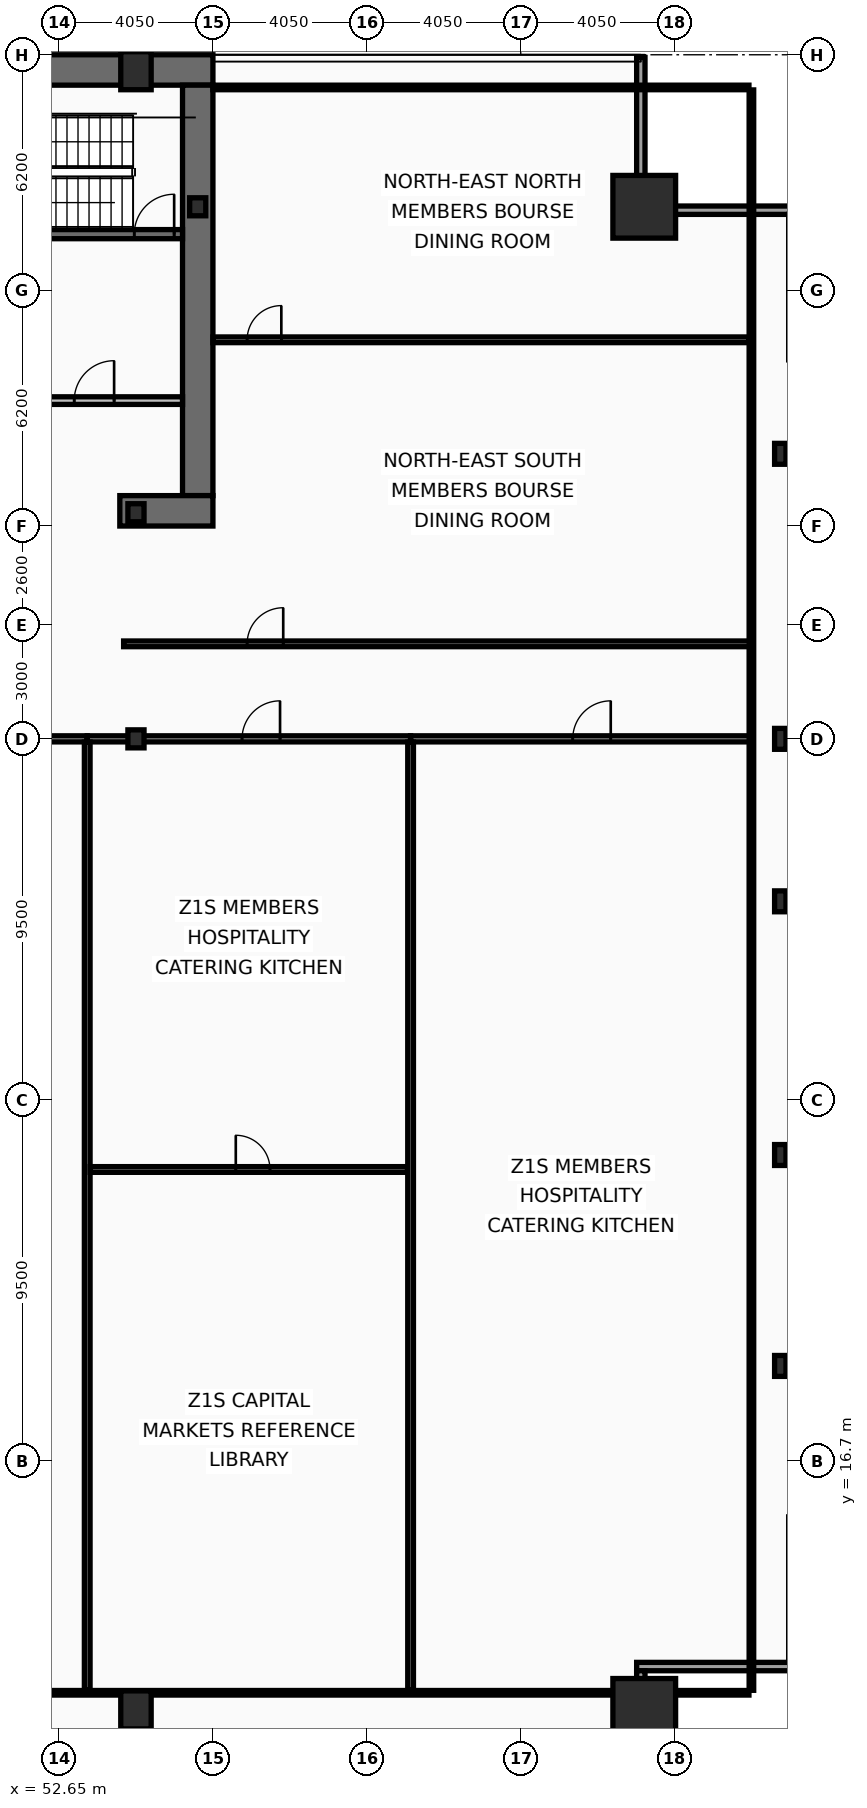
"""IFC4 building model, lengths in metres.
Left out: names, types, materials, properties, quantities, classifications, styles, units other than length and angle.
Written with IfcOpenShell. Run it as: python <this file> out.ifc"""

import sys

from ifc_helpers import new_model, si_unit, direction, frame, frame_2d, origin, origin_2d, place, context, subcontext, project, spatial, rectangle, hollow_rectangle, i_section, extrude, element, fill, save


model = new_model("IFC4")
c1 = context("Model", 3, precision=1e-05, world=origin(), true_north=direction((0.0, 1.0)))
c2 = subcontext(c1, "Body", "Model", "MODEL_VIEW")
j1 = project(units=[si_unit("LENGTHUNIT", "METRE"), si_unit("PLANEANGLEUNIT", "RADIAN")], contexts=[c1])
p1 = place(None, origin())
s1 = spatial("IfcSite", under=j1, at=p1, CompositionType="ELEMENT")
p2 = place(p1, origin())
s2 = spatial("IfcBuilding", under=s1, at=p2, CompositionType="ELEMENT")
p3 = place(p2, frame((0.0, 0.0, 45.8)))
s3 = spatial("IfcBuildingStorey", under=s2, at=p3, CompositionType="ELEMENT", Elevation=45.8)
p4 = place(p3, frame((16.2, 53.3, 0.0), z_axis=(0.0, 0.0, 1.0), x_axis=(1.0, 0.0, 0.0)))
e1 = element("IfcWall", 1, at=p4, inside=s3, PredefinedType="SHEAR", context=c2, shape_type="SweptSolid", body=[
    extrude(rectangle(XDim=40.5, YDim=0.8, at=frame_2d((20.25, 0.0))), origin(), (0.0, 0.0, 1.0), 3.82),
])
p5 = place(p3, frame((56.3, 52.9, 0.0), z_axis=(0.0, 0.0, 1.0), x_axis=(0.0, -1.0, 0.0)))
e2 = element("IfcWall", 2, at=p5, inside=s3, PredefinedType="SHEAR", context=c2, shape_type="SweptSolid", body=[
    extrude(rectangle(XDim=10.8, YDim=0.8, at=frame_2d((5.4, 0.0))), origin(), (0.0, 0.0, 1.0), 3.82),
])
p6 = place(p3, frame((56.7, 41.7, 0.0), z_axis=(0.0, 0.0, 1.0), x_axis=(-1.0, 0.0, 0.0)))
e3 = element("IfcWall", 3, at=p6, inside=s3, PredefinedType="SHEAR", context=c2, shape_type="SweptSolid", body=[
    extrude(rectangle(XDim=2.45, YDim=0.8, at=frame_2d((1.225, 0.0))), origin(), (0.0, 0.0, 1.0), 3.82),
])
p7 = place(p3, frame((48.63, 48.98, 0.0), z_axis=(0.0, 0.0, 1.0), x_axis=(1.0, 0.0, 0.0)))
e4 = element("IfcWall", 4, at=p7, inside=s3, PredefinedType="SHEAR", context=c2, shape_type="SweptSolid", body=[
    extrude(rectangle(XDim=7.27, YDim=0.24, at=frame_2d((3.635, 0.0))), origin(), (0.0, 0.0, 1.0), 3.82),
])
p8 = place(p7, frame((6.0, 0.0, 0.0)))
e5 = element("IfcOpeningElement", 5, at=p8, cuts=e4, PredefinedType="OPENING", context=c2, shape_type="SweptSolid", body=[
    extrude(rectangle(XDim=1.05, YDim=2.15, at=frame_2d((0.525, 1.075))), frame((0.0, 0.13, 0.0), z_axis=(0.0, -1.0, 0.0), x_axis=(1.0, 0.0, 0.0)), (0.0, 0.0, 1.0), 0.26),
])
for number, where, z_axis, x_axis in (
    (6, (68.05, 10.15, 0.0), (0.0, 0.0, 1.0), (1.0, 0.0, 0.0)),
    (7, (68.05, 49.7, 0.0), (0.0, 0.0, 1.0), (1.0, 0.0, 0.0)),
):
    element("IfcColumn", number, at=place(p3, frame(where, z_axis=z_axis, x_axis=x_axis)), inside=s3, PredefinedType="COLUMN", context=c2, shape_type="SweptSolid", body=[
        extrude(hollow_rectangle(XDim=1.65, YDim=1.65, WallThickness=0.075, at=origin_2d()), origin(), (0.0, 0.0, 1.0), 4.0),
    ])
for number, where, z_axis, x_axis in (
    (8, (54.675, 10.15, 0.0), (0.0, 0.0, 1.0), (1.0, 0.0, 0.0)),
    (9, (54.675, 53.28, 0.0), (0.0, 0.0, 1.0), (1.0, 0.0, 0.0)),
):
    element("IfcColumn", number, at=place(p3, frame(where, z_axis=z_axis, x_axis=x_axis)), inside=s3, PredefinedType="COLUMN", context=c2, shape_type="SweptSolid", body=[
        extrude(hollow_rectangle(XDim=0.8, YDim=1.0, WallThickness=0.055, at=origin_2d()), origin(), (0.0, 0.0, 1.0), 4.0),
    ])
for number, where, z_axis, x_axis in (
    (10, (71.63, 19.2, 0.0), (0.0, 0.0, 1.0), (1.0, 0.0, 0.0)),
    (11, (71.63, 24.75, 0.0), (0.0, 0.0, 1.0), (1.0, 0.0, 0.0)),
    (12, (71.63, 31.425, 0.0), (0.0, 0.0, 1.0), (1.0, 0.0, 0.0)),
    (13, (71.63, 35.7, 0.0), (0.0, 0.0, 1.0), (1.0, 0.0, 0.0)),
    (14, (71.63, 43.2, 0.0), (0.0, 0.0, 1.0), (1.0, 0.0, 0.0)),
):
    element("IfcColumn", number, at=place(p3, frame(where, z_axis=z_axis, x_axis=x_axis)), inside=s3, PredefinedType="COLUMN", context=c2, shape_type="SweptSolid", body=[
        extrude(i_section(OverallWidth=0.3, OverallDepth=0.55, WebThickness=0.015, FlangeThickness=0.029, at=origin_2d()), origin(), (0.0, 0.0, 1.0), 4.0),
    ])
for number, where, z_axis, x_axis in (
    (15, (56.3, 49.7, 0.0), (0.0, 0.0, 1.0), (1.0, 0.0, 0.0)),
    (16, (54.675, 35.7, 0.0), (0.0, 0.0, 1.0), (1.0, 0.0, 0.0)),
    (17, (54.675, 41.65, 0.0), (0.0, 0.0, 1.0), (1.0, 0.0, 0.0)),
):
    element("IfcColumn", number, at=place(p3, frame(where, z_axis=z_axis, x_axis=x_axis)), inside=s3, PredefinedType="COLUMN", context=c2, shape_type="SweptSolid", body=[
        extrude(i_section(OverallWidth=0.424, OverallDepth=0.474, WebThickness=0.048, FlangeThickness=0.077, at=origin_2d()), origin(), (0.0, 0.0, 1.0), 4.0),
    ])
p9 = place(p3, frame((67.96, 53.63, 0.0), z_axis=(0.0, 0.0, 1.0), x_axis=(0.0, -1.0, 0.0)))
e18 = element("IfcWall", 18, at=p9, inside=s3, PredefinedType="SOLIDWALL", context=c2, shape_type="SweptSolid", body=[
    extrude(rectangle(XDim=3.91, YDim=0.22, at=frame_2d((1.955, 0.0))), origin(), (0.0, 0.0, 1.0), 3.16),
])
for number, where, z_axis, x_axis in (
    (19, (67.85, 49.61, 0.0), (0.0, 0.0, 1.0), (1.0, 0.0, 0.0)),
    (20, (72.07, 11.29, 0.0), (0.0, 0.0, 1.0), (-1.0, 0.0, 0.0)),
):
    element("IfcWall", number, at=place(p3, frame(where, z_axis=z_axis, x_axis=x_axis)), inside=s3, PredefinedType="SOLIDWALL", context=c2, shape_type="SweptSolid", body=[
        extrude(rectangle(XDim=4.22, YDim=0.22, at=frame_2d((2.11, 0.0))), origin(), (0.0, 0.0, 1.0), 3.16),
    ])
p10 = place(p3, frame((67.96, 11.18, 0.0), z_axis=(0.0, 0.0, 1.0), x_axis=(0.0, -1.0, 0.0)))
e21 = element("IfcWall", 21, at=p10, inside=s3, PredefinedType="SOLIDWALL", context=c2, shape_type="SweptSolid", body=[
    extrude(rectangle(XDim=3.91, YDim=0.22, at=frame_2d((1.955, 0.0))), origin(), (0.0, 0.0, 1.0), 3.16),
])
p11 = place(p3, frame((51.9, 44.6, 0.0), z_axis=(0.0, 0.0, 1.0), x_axis=(1.0, 0.0, 0.0)))
e22 = element("IfcWall", 22, at=p11, inside=s3, PredefinedType="PARTITIONING", context=c2, shape_type="SweptSolid", body=[
    extrude(rectangle(XDim=4.0, YDim=0.2, at=frame_2d((2.0, 0.0))), origin(), (0.0, 0.0, 1.0), 3.82),
])
p12 = place(p11, frame((1.15, 0.0, 0.0)))
e23 = element("IfcOpeningElement", 23, at=p12, cuts=e22, PredefinedType="OPENING", context=c2, shape_type="SweptSolid", body=[
    extrude(rectangle(XDim=1.05, YDim=2.15, at=frame_2d((0.525, 1.075))), frame((0.0, 0.11, 0.0), z_axis=(0.0, -1.0, 0.0), x_axis=(1.0, 0.0, 0.0)), (0.0, 0.0, 1.0), 0.22),
])
p13 = place(p3, frame((54.35, 38.2, 0.0), z_axis=(0.0, 0.0, 1.0), x_axis=(1.0, 0.0, 0.0)))
e24 = element("IfcWall", 24, at=p13, inside=s3, PredefinedType="PARTITIONING", context=c2, shape_type="SweptSolid", body=[
    extrude(rectangle(XDim=16.52, YDim=0.15, at=frame_2d((8.26, 0.0))), origin(), (0.0, 0.0, 1.0), 3.01),
])
p14 = place(p13, frame((3.25, 0.0, 0.0)))
e25 = element("IfcOpeningElement", 25, at=p14, cuts=e24, PredefinedType="OPENING", context=c2, shape_type="SweptSolid", body=[
    extrude(rectangle(XDim=0.95, YDim=2.05, at=frame_2d((0.475, 1.025))), frame((0.0, 0.085, 0.0), z_axis=(0.0, -1.0, 0.0), x_axis=(1.0, 0.0, 0.0)), (0.0, 0.0, 1.0), 0.17),
])
p15 = place(p3, frame((56.7, 46.2, 0.0), z_axis=(0.0, 0.0, 1.0), x_axis=(1.0, 0.0, 0.0)))
e26 = element("IfcWall", 26, at=p15, inside=s3, PredefinedType="PARTITIONING", context=c2, shape_type="SweptSolid", body=[
    extrude(rectangle(XDim=14.105, YDim=0.15, at=frame_2d((7.052, 0.0))), origin(), (0.0, 0.0, 1.0), 3.16),
])
p16 = place(p15, frame((0.9, 0.0, 0.0)))
e27 = element("IfcOpeningElement", 27, at=p16, cuts=e26, PredefinedType="OPENING", context=c2, shape_type="SweptSolid", body=[
    extrude(rectangle(XDim=0.9, YDim=2.05, at=frame_2d((0.45, 1.025))), frame((0.0, 0.085, 0.0), z_axis=(0.0, -1.0, 0.0), x_axis=(1.0, 0.0, 0.0)), (0.0, 0.0, 1.0), 0.17),
])
p17 = place(p3, frame((35.595, 35.7, 0.0), z_axis=(0.0, 0.0, 1.0), x_axis=(1.0, 0.0, 0.0)))
e28 = element("IfcWall", 28, at=p17, inside=s3, PredefinedType="PARTITIONING", context=c2, shape_type="SweptSolid", body=[
    extrude(rectangle(XDim=17.797, YDim=0.16, at=frame_2d((8.899, 0.0))), origin(), (0.0, 0.0, 1.0), 3.01),
])
p18 = place(p17, frame((7.975, 0.0, 0.0)))
e29 = element("IfcOpeningElement", 29, at=p18, cuts=e28, PredefinedType="OPENING", context=c2, shape_type="SweptSolid", body=[
    extrude(rectangle(XDim=1.6, YDim=2.15, at=frame_2d((0.8, 1.075))), frame((0.0, 0.09, 0.0), z_axis=(0.0, -1.0, 0.0), x_axis=(1.0, 0.0, 0.0)), (0.0, 0.0, 1.0), 0.18),
])
p19 = place(p3, frame((53.392, 35.7, 0.0), z_axis=(0.0, 0.0, 1.0), x_axis=(1.0, 0.0, 0.0)))
e30 = element("IfcWall", 30, at=p19, inside=s3, PredefinedType="PARTITIONING", context=c2, shape_type="SweptSolid", body=[
    extrude(rectangle(XDim=8.51, YDim=0.16, at=frame_2d((4.255, 0.0))), origin(), (0.0, 0.0, 1.0), 3.01),
])
p20 = place(p19, frame((4.074, 0.0, 0.0)))
e31 = element("IfcOpeningElement", 31, at=p20, cuts=e30, PredefinedType="OPENING", context=c2, shape_type="SweptSolid", body=[
    extrude(rectangle(XDim=1.0, YDim=2.05, at=frame_2d((0.5, 1.025))), frame((0.0, 0.09, 0.0), z_axis=(0.0, -1.0, 0.0), x_axis=(1.0, 0.0, 0.0)), (0.0, 0.0, 1.0), 0.18),
])
p21 = place(p3, frame((53.392, 10.665, 0.0), z_axis=(0.0, 0.0, 1.0), x_axis=(0.0, 1.0, 0.0)))
e32 = element("IfcWall", 32, at=p21, inside=s3, PredefinedType="PARTITIONING", context=c2, shape_type="SweptSolid", body=[
    extrude(rectangle(XDim=24.95, YDim=0.15, at=frame_2d((12.475, 0.0))), origin(), (0.0, 0.0, 1.0), 3.21),
])
p22 = place(p3, frame((53.472, 24.369, 0.0), z_axis=(0.0, 0.0, 1.0), x_axis=(1.0, 0.0, 0.0)))
e33 = element("IfcWall", 33, at=p22, inside=s3, PredefinedType="PARTITIONING", context=c2, shape_type="SweptSolid", body=[
    extrude(rectangle(XDim=8.349, YDim=0.15, at=frame_2d((4.175, 0.0))), origin(), (0.0, 0.0, 1.0), 3.01),
])
p23 = place(p22, frame((3.829, 0.0, 0.0)))
e34 = element("IfcOpeningElement", 34, at=p23, cuts=e33, PredefinedType="OPENING", context=c2, shape_type="SweptSolid", body=[
    extrude(rectangle(XDim=0.9, YDim=2.05, at=frame_2d((0.45, 1.025))), frame((0.0, 0.085, 0.0), z_axis=(0.0, -1.0, 0.0), x_axis=(1.0, 0.0, 0.0)), (0.0, 0.0, 1.0), 0.17),
])
p24 = place(p3, frame((61.902, 35.7, 0.0), z_axis=(0.0, 0.0, 1.0), x_axis=(1.0, 0.0, 0.0)))
e35 = element("IfcWall", 35, at=p24, inside=s3, PredefinedType="PARTITIONING", context=c2, shape_type="SweptSolid", body=[
    extrude(rectangle(XDim=8.968, YDim=0.16, at=frame_2d((4.484, 0.0))), origin(), (0.0, 0.0, 1.0), 3.01),
])
p25 = place(p24, frame((4.267, 0.0, 0.0)))
e36 = element("IfcOpeningElement", 36, at=p25, cuts=e35, PredefinedType="OPENING", context=c2, shape_type="SweptSolid", body=[
    extrude(rectangle(XDim=1.0, YDim=2.05, at=frame_2d((0.5, 1.025))), frame((0.0, 0.09, 0.0), z_axis=(0.0, -1.0, 0.0), x_axis=(1.0, 0.0, 0.0)), (0.0, 0.0, 1.0), 0.18),
])
p26 = place(p3, frame((61.902, 10.665, 0.0), z_axis=(0.0, 0.0, 1.0), x_axis=(0.0, 1.0, 0.0)))
e37 = element("IfcWall", 37, at=p26, inside=s3, PredefinedType="PARTITIONING", context=c2, shape_type="SweptSolid", body=[
    extrude(rectangle(XDim=24.95, YDim=0.15, at=frame_2d((12.475, 0.0))), origin(), (0.0, 0.0, 1.0), 3.01),
])
p27 = place(p3, frame((70.87, 10.665, 0.0), z_axis=(0.0, 0.0, 1.0), x_axis=(0.0, 1.0, 0.0)))
e38 = element("IfcWall", 38, at=p27, inside=s3, PredefinedType="PARTITIONING", context=c2, shape_type="SweptSolid", body=[
    extrude(rectangle(XDim=42.11, YDim=0.12, at=frame_2d((21.055, 0.0))), origin(), (0.0, 0.0, 1.0), 3.01),
])
p28 = place(p3, frame((56.7, 52.84, 0.0), z_axis=(0.0, 0.0, 1.0), x_axis=(1.0, 0.0, 0.0)))
e39 = element("IfcWall", 39, at=p28, inside=s3, PredefinedType="PARTITIONING", context=c2, shape_type="SweptSolid", body=[
    extrude(rectangle(XDim=14.105, YDim=0.12, at=frame_2d((7.052, 0.0))), origin(), (0.0, 0.0, 1.0), 3.82),
])
p29 = place(p3, frame((2.095, 10.6, 0.0), z_axis=(0.0, 0.0, 1.0), x_axis=(1.0, 0.0, 0.0)))
e40 = element("IfcWall", 40, at=p29, inside=s3, PredefinedType="PARTITIONING", context=c2, shape_type="SweptSolid", body=[
    extrude(rectangle(XDim=68.71, YDim=0.12, at=frame_2d((34.355, 0.0))), origin(), (0.0, 0.0, 1.0), 3.01),
])
p30 = place(p8, origin())
e41 = element("IfcDoor", 41, at=p30, inside=s3, OperationType="SINGLE_SWING_RIGHT", PredefinedType="DOOR", context=c2, shape_type="SweptSolid", body=[
    extrude(rectangle(XDim=1.05, YDim=2.15, at=frame_2d((0.525, 1.075))), frame((0.0, 0.025, 0.0), z_axis=(0.0, -1.0, 0.0), x_axis=(1.0, 0.0, 0.0)), (0.0, 0.0, 1.0), 0.05),
])
fill(e5, e41)
p31 = place(p12, origin())
e42 = element("IfcDoor", 42, at=p31, inside=s3, OperationType="SINGLE_SWING_RIGHT", PredefinedType="DOOR", context=c2, shape_type="SweptSolid", body=[
    extrude(rectangle(XDim=1.05, YDim=2.15, at=frame_2d((0.525, 1.075))), frame((0.0, 0.025, 0.0), z_axis=(0.0, -1.0, 0.0), x_axis=(1.0, 0.0, 0.0)), (0.0, 0.0, 1.0), 0.05),
])
fill(e23, e42)
p32 = place(p14, origin())
e43 = element("IfcDoor", 43, at=p32, inside=s3, OperationType="SINGLE_SWING_RIGHT", PredefinedType="DOOR", context=c2, shape_type="SweptSolid", body=[
    extrude(rectangle(XDim=0.95, YDim=2.05, at=frame_2d((0.475, 1.025))), frame((0.0, 0.025, 0.0), z_axis=(0.0, -1.0, 0.0), x_axis=(1.0, 0.0, 0.0)), (0.0, 0.0, 1.0), 0.05),
])
fill(e25, e43)
p33 = place(p16, origin())
e44 = element("IfcDoor", 44, at=p33, inside=s3, OperationType="SINGLE_SWING_RIGHT", PredefinedType="DOOR", context=c2, shape_type="SweptSolid", body=[
    extrude(rectangle(XDim=0.9, YDim=2.05, at=frame_2d((0.45, 1.025))), frame((0.0, 0.025, 0.0), z_axis=(0.0, -1.0, 0.0), x_axis=(1.0, 0.0, 0.0)), (0.0, 0.0, 1.0), 0.05),
])
fill(e27, e44)
p34 = place(p20, origin())
e45 = element("IfcDoor", 45, at=p34, inside=s3, OperationType="SINGLE_SWING_RIGHT", PredefinedType="DOOR", context=c2, shape_type="SweptSolid", body=[
    extrude(rectangle(XDim=1.0, YDim=2.05, at=frame_2d((0.5, 1.025))), frame((0.0, 0.025, 0.0), z_axis=(0.0, -1.0, 0.0), x_axis=(1.0, 0.0, 0.0)), (0.0, 0.0, 1.0), 0.05),
])
fill(e31, e45)
p35 = place(p23, origin())
e46 = element("IfcDoor", 46, at=p35, inside=s3, OperationType="SINGLE_SWING_LEFT", PredefinedType="DOOR", context=c2, shape_type="SweptSolid", body=[
    extrude(rectangle(XDim=0.9, YDim=2.05, at=frame_2d((0.45, 1.025))), frame((0.0, 0.025, 0.0), z_axis=(0.0, -1.0, 0.0), x_axis=(1.0, 0.0, 0.0)), (0.0, 0.0, 1.0), 0.05),
])
fill(e34, e46)
p36 = place(p25, origin())
e47 = element("IfcDoor", 47, at=p36, inside=s3, OperationType="SINGLE_SWING_RIGHT", PredefinedType="DOOR", context=c2, shape_type="SweptSolid", body=[
    extrude(rectangle(XDim=1.0, YDim=2.05, at=frame_2d((0.5, 1.025))), frame((0.0, 0.025, 0.0), z_axis=(0.0, -1.0, 0.0), x_axis=(1.0, 0.0, 0.0)), (0.0, 0.0, 1.0), 0.05),
])
fill(e36, e47)
save(model, sys.argv[1])
